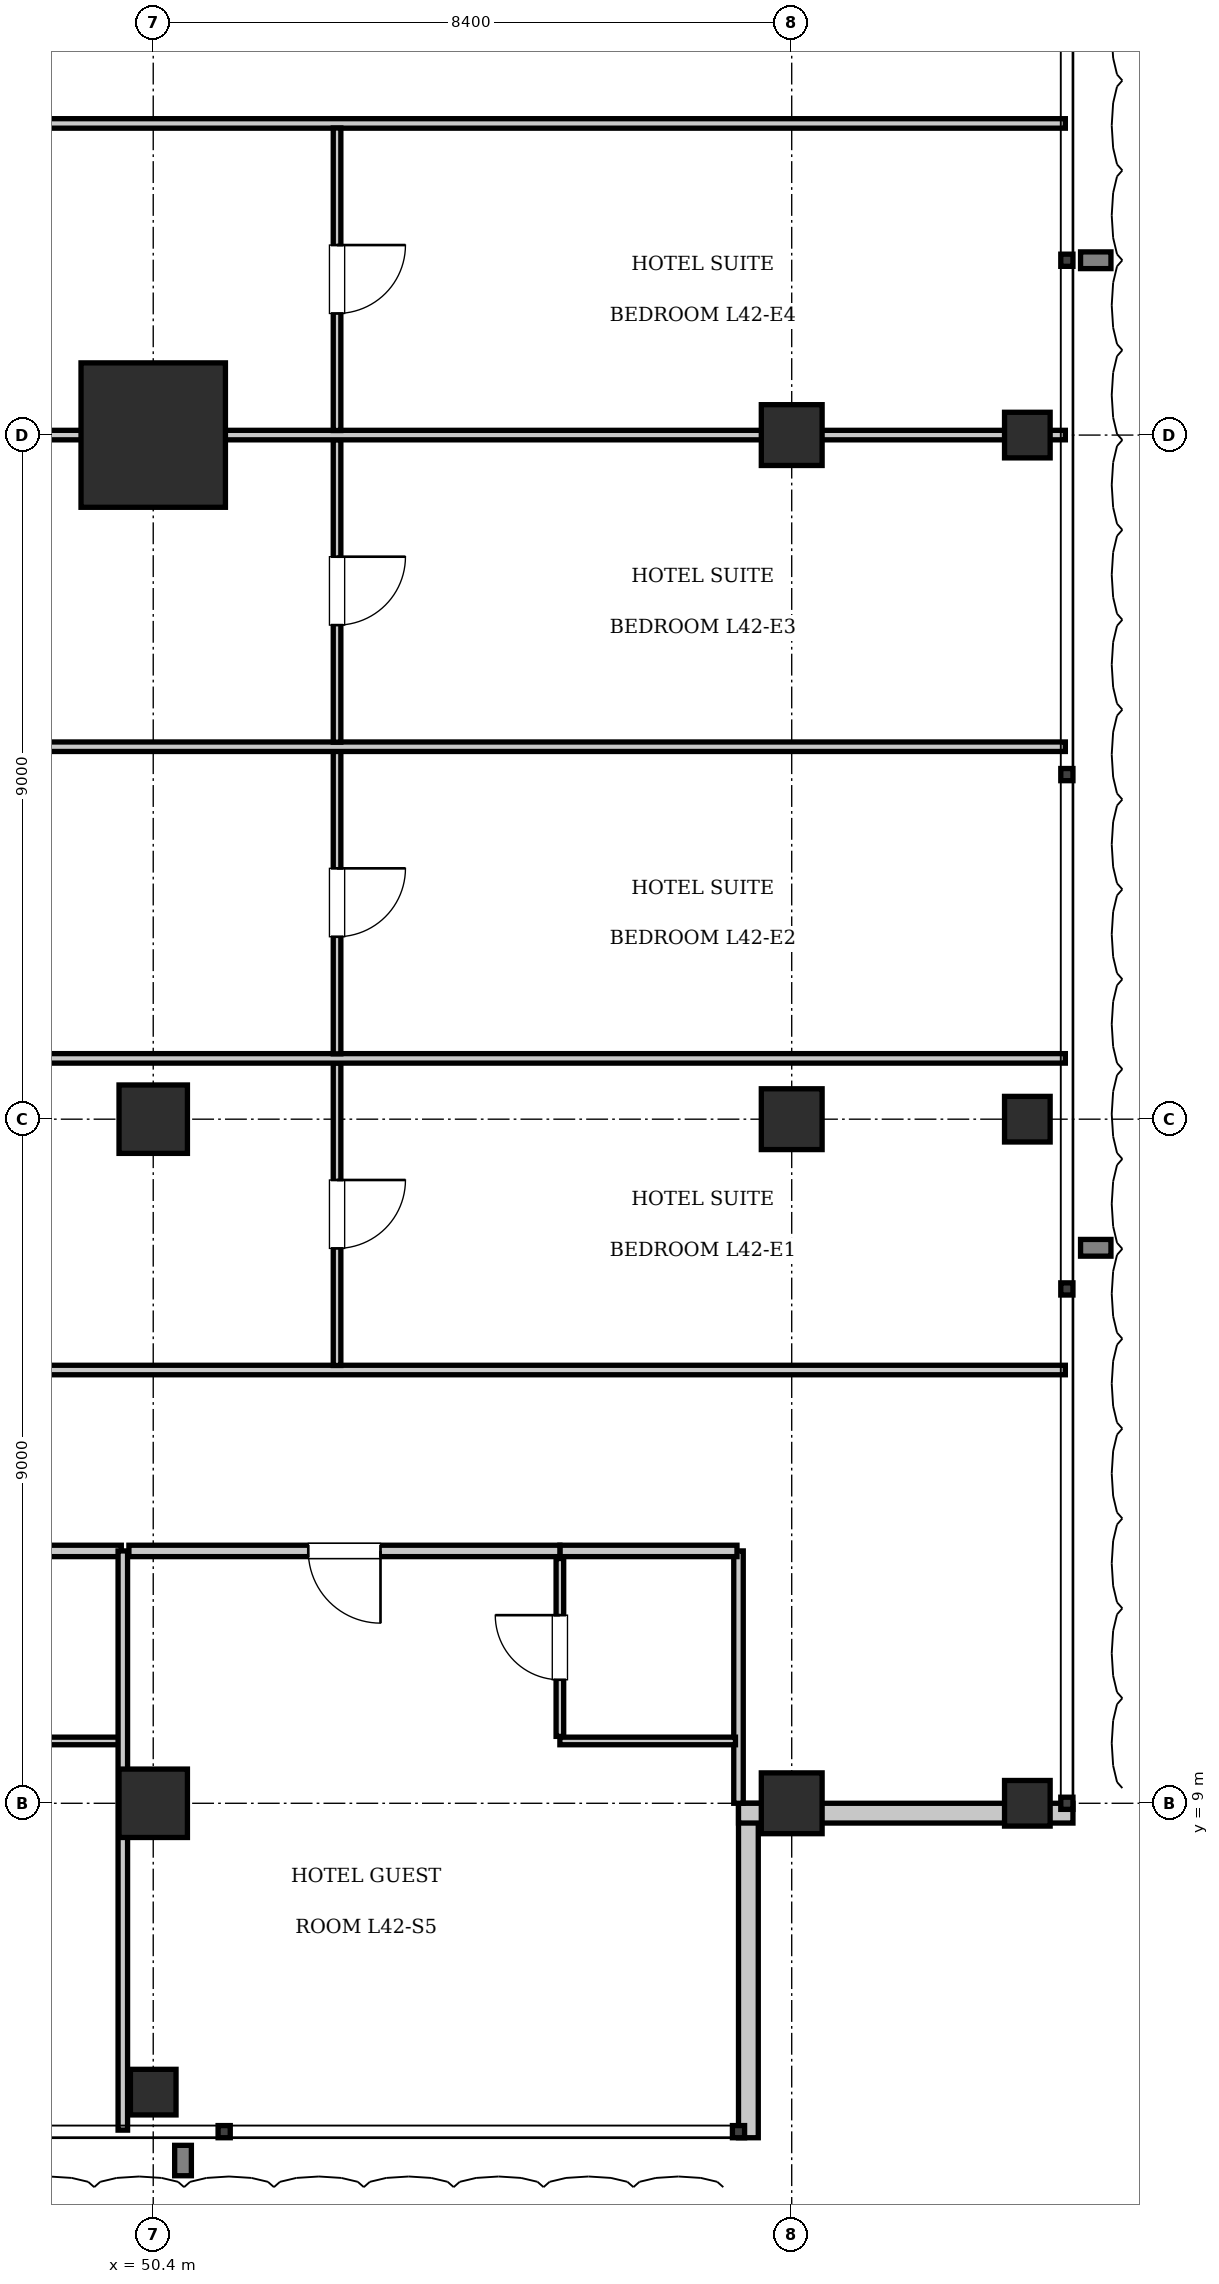
"""IFC4 building model, lengths in metres.
Left out: names, types, materials, properties, quantities, classifications, styles, units other than length and angle.
Written with IfcOpenShell. Run it as: python <this file> out.ifc"""

import sys

from ifc_helpers import new_model, si_unit, direction, frame, frame_2d, origin, origin_2d, place, context, subcontext, project, spatial, rectangle, i_section, extrude, element, fill, save


model = new_model("IFC4")
c1 = context("Model", 3, precision=1e-05, world=origin(), true_north=direction((0.0, 1.0)))
c2 = subcontext(c1, "Body", "Model", "MODEL_VIEW")
j1 = project(units=[si_unit("LENGTHUNIT", "METRE"), si_unit("PLANEANGLEUNIT", "RADIAN")], contexts=[c1])
p1 = place(None, origin())
s1 = spatial("IfcSite", under=j1, at=p1, CompositionType="ELEMENT")
p2 = place(p1, origin())
s2 = spatial("IfcBuilding", under=s1, at=p2, CompositionType="ELEMENT")
p3 = place(p2, frame((0.0, 0.0, 173.6)))
s3 = spatial("IfcBuildingStorey", under=s2, at=p3, CompositionType="ELEMENT", Elevation=173.6)
p4 = place(p3, frame((50.4, 27.0, 0.0), z_axis=(0.0, 0.0, 1.0), x_axis=(1.0, 0.0, 0.0)))
e1 = element("IfcColumn", 1, at=p4, inside=s3, PredefinedType="COLUMN", context=c2, shape_type="SweptSolid", body=[
    extrude(rectangle(XDim=1.9, YDim=1.9, at=origin_2d()), origin(), (0.0, 0.0, 1.0), 3.85),
])
for number, where, z_axis, x_axis in (
    (2, (50.4, 18.0, 0.0), (0.0, 0.0, 1.0), (1.0, 0.0, 0.0)),
    (3, (50.4, 9.0, 0.0), (0.0, 0.0, 1.0), (1.0, 0.0, 0.0)),
):
    element("IfcColumn", number, at=place(p3, frame(where, z_axis=z_axis, x_axis=x_axis)), inside=s3, PredefinedType="COLUMN", context=c2, shape_type="SweptSolid", body=[
        extrude(rectangle(XDim=0.9, YDim=0.9, at=origin_2d()), origin(), (0.0, 0.0, 1.0), 3.85),
    ])
for number, where, z_axis, x_axis in (
    (4, (58.8, 9.0, 0.0), (0.0, 0.0, 1.0), (1.0, 0.0, 0.0)),
    (5, (58.8, 18.0, 0.0), (0.0, 0.0, 1.0), (1.0, 0.0, 0.0)),
    (6, (58.8, 27.0, 0.0), (0.0, 0.0, 1.0), (1.0, 0.0, 0.0)),
):
    element("IfcColumn", number, at=place(p3, frame(where, z_axis=z_axis, x_axis=x_axis)), inside=s3, PredefinedType="COLUMN", context=c2, shape_type="SweptSolid", body=[
        extrude(rectangle(XDim=0.8, YDim=0.8, at=origin_2d()), origin(), (0.0, 0.0, 1.0), 3.85),
    ])
for number, where, z_axis, x_axis in (
    (7, (61.9, 9.0, 0.0), (0.0, 0.0, 1.0), (1.0, 0.0, 0.0)),
    (8, (61.9, 18.0, 0.0), (0.0, 0.0, 1.0), (1.0, 0.0, 0.0)),
    (9, (61.9, 27.0, 0.0), (0.0, 0.0, 1.0), (1.0, 0.0, 0.0)),
    (10, (50.4, 5.2, 0.0), (0.0, 0.0, 1.0), (1.0, 0.0, 0.0)),
):
    element("IfcColumn", number, at=place(p3, frame(where, z_axis=z_axis, x_axis=x_axis)), inside=s3, PredefinedType="COLUMN", context=c2, shape_type="SweptSolid", body=[
        extrude(i_section(OverallWidth=0.6, OverallDepth=0.6, WebThickness=0.025, FlangeThickness=0.038, at=origin_2d()), origin(), (0.0, 0.0, 1.0), 3.85),
    ])
p5 = place(p3, frame((58.23, 9.0, 0.0), z_axis=(0.0, 0.0, 1.0), x_axis=(0.0, -1.0, 0.0)))
e11 = element("IfcWall", 11, at=p5, inside=s3, PredefinedType="SOLIDWALL", context=c2, shape_type="SweptSolid", body=[
    extrude(rectangle(XDim=4.4, YDim=0.26, at=frame_2d((2.2, 0.0))), origin(), (0.0, 0.0, 1.0), 3.61),
])
p6 = place(p3, frame((62.5, 8.87, 0.0), z_axis=(0.0, 0.0, 1.0), x_axis=(-1.0, 0.0, 0.0)))
e12 = element("IfcWall", 12, at=p6, inside=s3, PredefinedType="SOLIDWALL", context=c2, shape_type="SweptSolid", body=[
    extrude(rectangle(XDim=4.4, YDim=0.26, at=frame_2d((2.2, 0.0))), origin(), (0.0, 0.0, 1.0), 3.007),
])
p7 = place(p3, frame((58.1, 9.0, 0.0), z_axis=(0.0, 0.0, 1.0), x_axis=(0.0, 1.0, 0.0)))
e13 = element("IfcWall", 13, at=p7, inside=s3, PredefinedType="PARTITIONING", context=c2, shape_type="SweptSolid", body=[
    extrude(rectangle(XDim=3.32, YDim=0.125, at=frame_2d((1.66, 0.0))), origin(), (0.0, 0.0, 1.0), 3.61),
])
p8 = place(p3, frame((47.65, 12.32, 0.0), z_axis=(0.0, 0.0, 1.0), x_axis=(1.0, 0.0, 0.0)))
e14 = element("IfcWall", 14, at=p8, inside=s3, PredefinedType="PARTITIONING", context=c2, shape_type="SweptSolid", body=[
    extrude(rectangle(XDim=2.33, YDim=0.15, at=frame_2d((1.165, 0.0))), origin(), (0.0, 0.0, 1.0), 3.61),
])
p9 = place(p3, frame((47.65, 9.82, 0.0), z_axis=(0.0, 0.0, 1.0), x_axis=(1.0, 0.0, 0.0)))
e15 = element("IfcWall", 15, at=p9, inside=s3, PredefinedType="PARTITIONING", context=c2, shape_type="SweptSolid", body=[
    extrude(rectangle(XDim=2.31, YDim=0.1, at=frame_2d((1.155, 0.0))), origin(), (0.0, 0.0, 1.0), 3.61),
])
p10 = place(p3, frame((50.0, 4.7, 0.0), z_axis=(0.0, 0.0, 1.0), x_axis=(0.0, 1.0, 0.0)))
e16 = element("IfcWall", 16, at=p10, inside=s3, PredefinedType="PARTITIONING", context=c2, shape_type="SweptSolid", body=[
    extrude(rectangle(XDim=7.62, YDim=0.125, at=frame_2d((3.81, 0.0))), origin(), (0.0, 0.0, 1.0), 3.61),
])
p11 = place(p3, frame((55.75, 12.32, 0.0), z_axis=(0.0, 0.0, 1.0), x_axis=(1.0, 0.0, 0.0)))
e17 = element("IfcWall", 17, at=p11, inside=s3, PredefinedType="PARTITIONING", context=c2, shape_type="SweptSolid", body=[
    extrude(rectangle(XDim=2.33, YDim=0.15, at=frame_2d((1.165, 0.0))), origin(), (0.0, 0.0, 1.0), 3.61),
])
p12 = place(p3, frame((55.75, 9.82, 0.0), z_axis=(0.0, 0.0, 1.0), x_axis=(1.0, 0.0, 0.0)))
e18 = element("IfcWall", 18, at=p12, inside=s3, PredefinedType="PARTITIONING", context=c2, shape_type="SweptSolid", body=[
    extrude(rectangle(XDim=2.31, YDim=0.1, at=frame_2d((1.155, 0.0))), origin(), (0.0, 0.0, 1.0), 3.61),
])
p13 = place(p3, frame((55.75, 9.88, 0.0), z_axis=(0.0, 0.0, 1.0), x_axis=(0.0, 1.0, 0.0)))
e19 = element("IfcWall", 19, at=p13, inside=s3, PredefinedType="PARTITIONING", context=c2, shape_type="SweptSolid", body=[
    extrude(rectangle(XDim=2.34, YDim=0.1, at=frame_2d((1.17, 0.0))), origin(), (0.0, 0.0, 1.0), 3.61),
])
p14 = place(p13, frame((0.745, 0.0, 0.0)))
e20 = element("IfcOpeningElement", 20, at=p14, cuts=e19, PredefinedType="OPENING", context=c2, shape_type="SweptSolid", body=[
    extrude(rectangle(XDim=0.85, YDim=2.1, at=frame_2d((0.425, 1.05))), frame((0.0, 0.06, 0.0), z_axis=(0.0, -1.0, 0.0), x_axis=(1.0, 0.0, 0.0)), (0.0, 0.0, 1.0), 0.12),
])
p15 = place(p3, frame((50.08, 12.32, 0.0), z_axis=(0.0, 0.0, 1.0), x_axis=(1.0, 0.0, 0.0)))
e21 = element("IfcWall", 21, at=p15, inside=s3, PredefinedType="PARTITIONING", context=c2, shape_type="SweptSolid", body=[
    extrude(rectangle(XDim=5.67, YDim=0.15, at=frame_2d((2.835, 0.0))), origin(), (0.0, 0.0, 1.0), 3.61),
])
p16 = place(p15, frame((2.36, 0.0, 0.0)))
e22 = element("IfcOpeningElement", 22, at=p16, cuts=e21, PredefinedType="OPENING", context=c2, shape_type="SweptSolid", body=[
    extrude(rectangle(XDim=0.95, YDim=2.15, at=frame_2d((0.475, 1.075))), frame((0.0, 0.085, 0.0), z_axis=(0.0, -1.0, 0.0), x_axis=(1.0, 0.0, 0.0)), (0.0, 0.0, 1.0), 0.17),
])
for number, where, z_axis, x_axis in (
    (23, (39.88, 14.7, 0.0), (0.0, 0.0, 1.0), (1.0, 0.0, 0.0)),
    (24, (39.88, 31.1, 0.0), (0.0, 0.0, 1.0), (1.0, 0.0, 0.0)),
):
    element("IfcWall", number, at=place(p3, frame(where, z_axis=z_axis, x_axis=x_axis)), inside=s3, PredefinedType="PARTITIONING", context=c2, shape_type="SweptSolid", body=[
        extrude(rectangle(XDim=22.52, YDim=0.125, at=frame_2d((11.26, 0.0))), origin(), (0.0, 0.0, 1.0), 3.61),
    ])
p17 = place(p3, frame((52.818, 14.76, 0.0), z_axis=(0.0, 0.0, 1.0), x_axis=(0.0, 1.0, 0.0)))
e25 = element("IfcWall", 25, at=p17, inside=s3, PredefinedType="PARTITIONING", context=c2, shape_type="SweptSolid", body=[
    extrude(rectangle(XDim=3.98, YDim=0.1, at=frame_2d((1.99, 0.0))), origin(), (0.0, 0.0, 1.0), 3.61),
])
p18 = place(p17, frame((1.54, 0.0, 0.0)))
e26 = element("IfcOpeningElement", 26, at=p18, cuts=e25, PredefinedType="OPENING", context=c2, shape_type="SweptSolid", body=[
    extrude(rectangle(XDim=0.9, YDim=2.1, at=frame_2d((0.45, 1.05))), frame((0.0, 0.06, 0.0), z_axis=(0.0, -1.0, 0.0), x_axis=(1.0, 0.0, 0.0)), (0.0, 0.0, 1.0), 0.12),
])
p19 = place(p3, frame((39.88, 18.8, 0.0), z_axis=(0.0, 0.0, 1.0), x_axis=(1.0, 0.0, 0.0)))
e27 = element("IfcWall", 27, at=p19, inside=s3, PredefinedType="PARTITIONING", context=c2, shape_type="SweptSolid", body=[
    extrude(rectangle(XDim=22.52, YDim=0.125, at=frame_2d((11.26, 0.0))), origin(), (0.0, 0.0, 1.0), 3.61),
])
p20 = place(p3, frame((52.818, 18.86, 0.0), z_axis=(0.0, 0.0, 1.0), x_axis=(0.0, 1.0, 0.0)))
e28 = element("IfcWall", 28, at=p20, inside=s3, PredefinedType="PARTITIONING", context=c2, shape_type="SweptSolid", body=[
    extrude(rectangle(XDim=3.98, YDim=0.1, at=frame_2d((1.99, 0.0))), origin(), (0.0, 0.0, 1.0), 3.61),
])
p21 = place(p20, frame((1.54, 0.0, 0.0)))
e29 = element("IfcOpeningElement", 29, at=p21, cuts=e28, PredefinedType="OPENING", context=c2, shape_type="SweptSolid", body=[
    extrude(rectangle(XDim=0.9, YDim=2.1, at=frame_2d((0.45, 1.05))), frame((0.0, 0.06, 0.0), z_axis=(0.0, -1.0, 0.0), x_axis=(1.0, 0.0, 0.0)), (0.0, 0.0, 1.0), 0.12),
])
p22 = place(p3, frame((39.88, 22.9, 0.0), z_axis=(0.0, 0.0, 1.0), x_axis=(1.0, 0.0, 0.0)))
e30 = element("IfcWall", 30, at=p22, inside=s3, PredefinedType="PARTITIONING", context=c2, shape_type="SweptSolid", body=[
    extrude(rectangle(XDim=22.52, YDim=0.125, at=frame_2d((11.26, 0.0))), origin(), (0.0, 0.0, 1.0), 3.61),
])
p23 = place(p3, frame((52.818, 22.96, 0.0), z_axis=(0.0, 0.0, 1.0), x_axis=(0.0, 1.0, 0.0)))
e31 = element("IfcWall", 31, at=p23, inside=s3, PredefinedType="PARTITIONING", context=c2, shape_type="SweptSolid", body=[
    extrude(rectangle(XDim=3.98, YDim=0.1, at=frame_2d((1.99, 0.0))), origin(), (0.0, 0.0, 1.0), 3.61),
])
p24 = place(p23, frame((1.54, 0.0, 0.0)))
e32 = element("IfcOpeningElement", 32, at=p24, cuts=e31, PredefinedType="OPENING", context=c2, shape_type="SweptSolid", body=[
    extrude(rectangle(XDim=0.9, YDim=2.1, at=frame_2d((0.45, 1.05))), frame((0.0, 0.06, 0.0), z_axis=(0.0, -1.0, 0.0), x_axis=(1.0, 0.0, 0.0)), (0.0, 0.0, 1.0), 0.12),
])
p25 = place(p3, frame((39.88, 27.0, 0.0), z_axis=(0.0, 0.0, 1.0), x_axis=(1.0, 0.0, 0.0)))
e33 = element("IfcWall", 33, at=p25, inside=s3, PredefinedType="PARTITIONING", context=c2, shape_type="SweptSolid", body=[
    extrude(rectangle(XDim=22.52, YDim=0.125, at=frame_2d((11.26, 0.0))), origin(), (0.0, 0.0, 1.0), 2.41),
])
p26 = place(p3, frame((52.818, 27.06, 0.0), z_axis=(0.0, 0.0, 1.0), x_axis=(0.0, 1.0, 0.0)))
e34 = element("IfcWall", 34, at=p26, inside=s3, PredefinedType="PARTITIONING", context=c2, shape_type="SweptSolid", body=[
    extrude(rectangle(XDim=3.98, YDim=0.1, at=frame_2d((1.99, 0.0))), origin(), (0.0, 0.0, 1.0), 3.61),
])
p27 = place(p26, frame((1.54, 0.0, 0.0)))
e35 = element("IfcOpeningElement", 35, at=p27, cuts=e34, PredefinedType="OPENING", context=c2, shape_type="SweptSolid", body=[
    extrude(rectangle(XDim=0.9, YDim=2.1, at=frame_2d((0.45, 1.05))), frame((0.0, 0.06, 0.0), z_axis=(0.0, -1.0, 0.0), x_axis=(1.0, 0.0, 0.0)), (0.0, 0.0, 1.0), 0.12),
])
p28 = place(p14, origin())
e36 = element("IfcDoor", 36, at=p28, inside=s3, OperationType="SINGLE_SWING_RIGHT", PredefinedType="DOOR", context=c2, shape_type="SweptSolid", body=[
    extrude(rectangle(XDim=0.85, YDim=2.1, at=frame_2d((0.425, 1.05))), frame((0.0, 0.025, 0.0), z_axis=(0.0, -1.0, 0.0), x_axis=(1.0, 0.0, 0.0)), (0.0, 0.0, 1.0), 0.05),
])
fill(e20, e36)
p29 = place(p16, frame((0.95, 0.0, 0.0), z_axis=(0.0, 0.0, 1.0), x_axis=(-1.0, 0.0, 0.0)))
e37 = element("IfcDoor", 37, at=p29, inside=s3, OperationType="SINGLE_SWING_LEFT", PredefinedType="DOOR", context=c2, shape_type="SweptSolid", body=[
    extrude(rectangle(XDim=0.95, YDim=2.15, at=frame_2d((0.475, 1.075))), frame((0.0, 0.025, 0.0), z_axis=(0.0, -1.0, 0.0), x_axis=(1.0, 0.0, 0.0)), (0.0, 0.0, 1.0), 0.05),
])
fill(e22, e37)
p30 = place(p18, frame((0.9, 0.0, 0.0), z_axis=(0.0, 0.0, 1.0), x_axis=(-1.0, 0.0, 0.0)))
e38 = element("IfcDoor", 38, at=p30, inside=s3, OperationType="SINGLE_SWING_LEFT", PredefinedType="DOOR", context=c2, shape_type="SweptSolid", body=[
    extrude(rectangle(XDim=0.9, YDim=2.1, at=frame_2d((0.45, 1.05))), frame((0.0, 0.025, 0.0), z_axis=(0.0, -1.0, 0.0), x_axis=(1.0, 0.0, 0.0)), (0.0, 0.0, 1.0), 0.05),
])
fill(e26, e38)
p31 = place(p21, frame((0.9, 0.0, 0.0), z_axis=(0.0, 0.0, 1.0), x_axis=(-1.0, 0.0, 0.0)))
e39 = element("IfcDoor", 39, at=p31, inside=s3, OperationType="SINGLE_SWING_LEFT", PredefinedType="DOOR", context=c2, shape_type="SweptSolid", body=[
    extrude(rectangle(XDim=0.9, YDim=2.1, at=frame_2d((0.45, 1.05))), frame((0.0, 0.025, 0.0), z_axis=(0.0, -1.0, 0.0), x_axis=(1.0, 0.0, 0.0)), (0.0, 0.0, 1.0), 0.05),
])
fill(e29, e39)
p32 = place(p24, frame((0.9, 0.0, 0.0), z_axis=(0.0, 0.0, 1.0), x_axis=(-1.0, 0.0, 0.0)))
e40 = element("IfcDoor", 40, at=p32, inside=s3, OperationType="SINGLE_SWING_LEFT", PredefinedType="DOOR", context=c2, shape_type="SweptSolid", body=[
    extrude(rectangle(XDim=0.9, YDim=2.1, at=frame_2d((0.45, 1.05))), frame((0.0, 0.025, 0.0), z_axis=(0.0, -1.0, 0.0), x_axis=(1.0, 0.0, 0.0)), (0.0, 0.0, 1.0), 0.05),
])
fill(e32, e40)
p33 = place(p27, frame((0.9, 0.0, 0.0), z_axis=(0.0, 0.0, 1.0), x_axis=(-1.0, 0.0, 0.0)))
e41 = element("IfcDoor", 41, at=p33, inside=s3, OperationType="SINGLE_SWING_LEFT", PredefinedType="DOOR", context=c2, shape_type="SweptSolid", body=[
    extrude(rectangle(XDim=0.9, YDim=2.1, at=frame_2d((0.45, 1.05))), frame((0.0, 0.025, 0.0), z_axis=(0.0, -1.0, 0.0), x_axis=(1.0, 0.0, 0.0)), (0.0, 0.0, 1.0), 0.05),
])
fill(e35, e41)
save(model, sys.argv[1])
